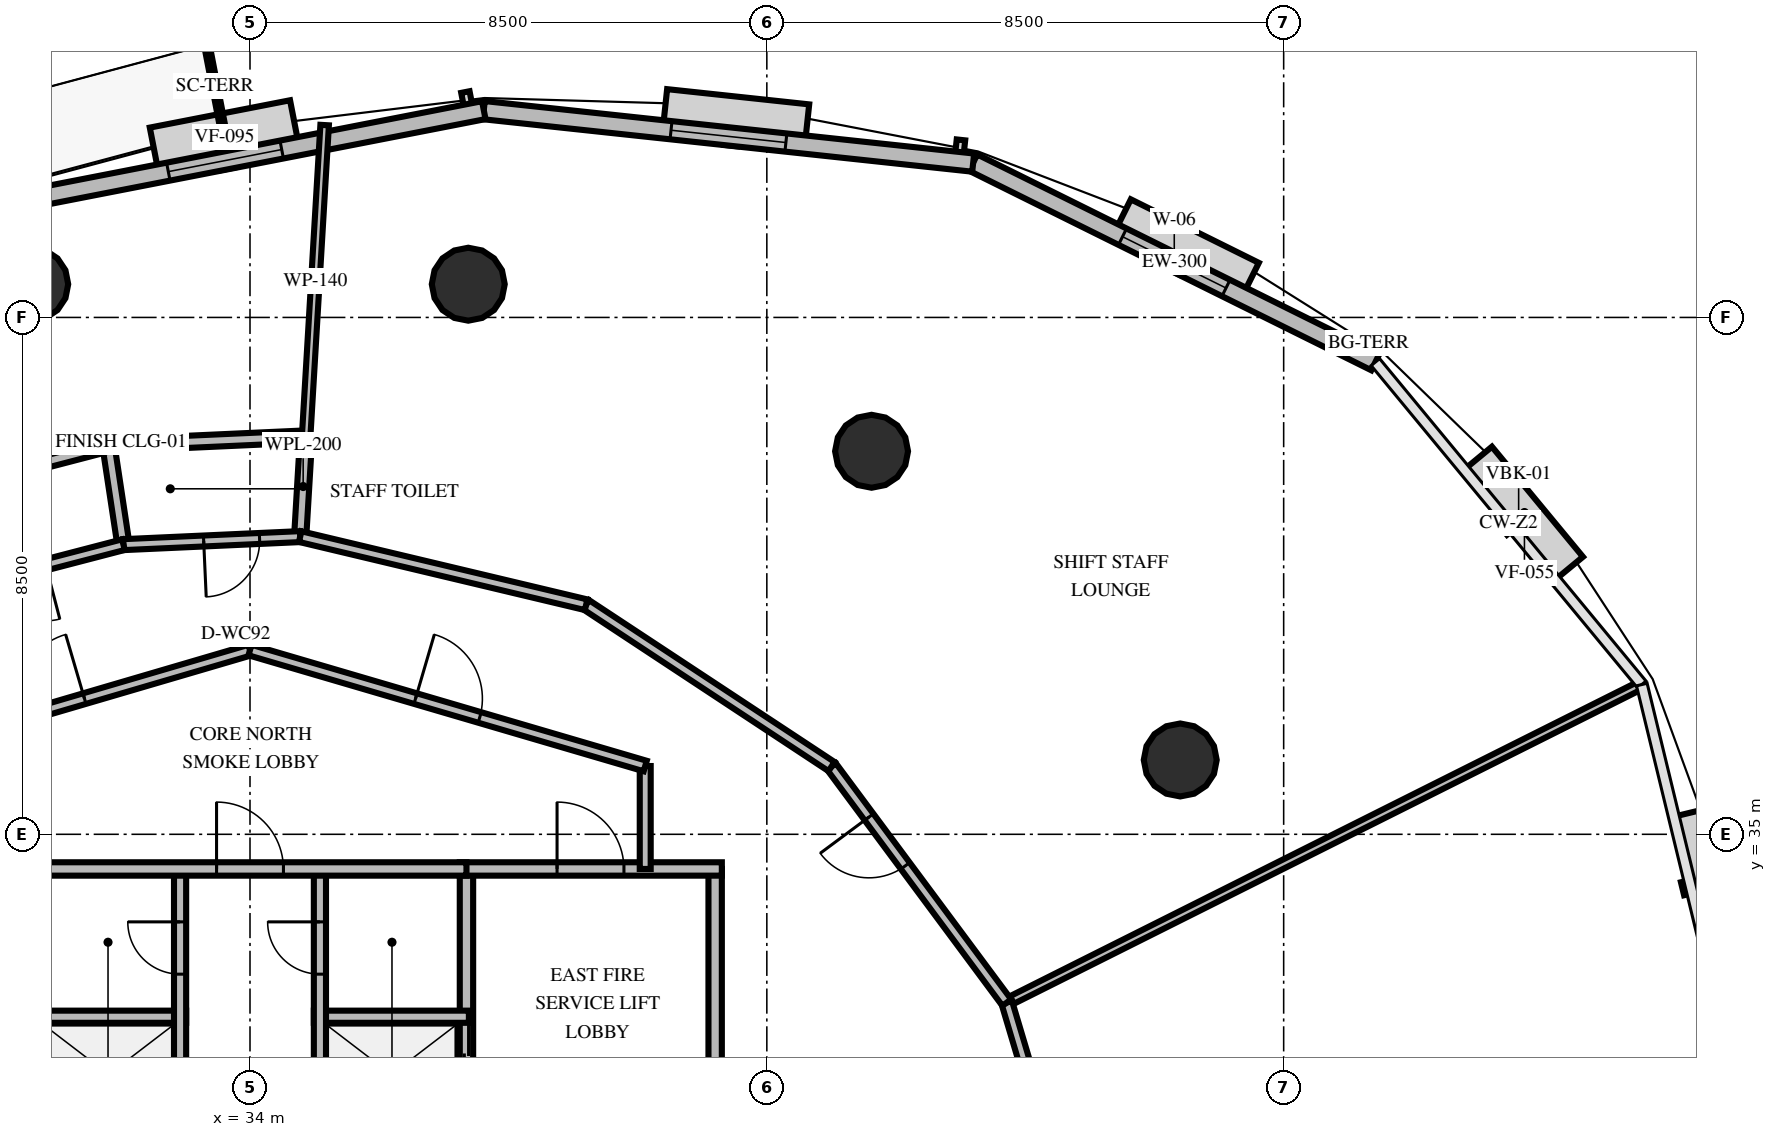
"""IFC4 building model, lengths in metres.
Left out: names, types, materials, properties, quantities, classifications, styles, units other than length and angle.
Written with IfcOpenShell. Run it as: python <this file> out.ifc"""

import sys

from ifc_helpers import new_model, si_unit, direction, frame, frame_2d, origin, origin_2d, place, context, subcontext, project, spatial, rectangle, circle, extrude, element, fill, save


model = new_model("IFC4")
c1 = context("Model", 3, precision=1e-05, world=origin(), true_north=direction((0.0, 1.0)))
c2 = subcontext(c1, "Body", "Model", "MODEL_VIEW")
j1 = project(units=[si_unit("LENGTHUNIT", "METRE"), si_unit("PLANEANGLEUNIT", "RADIAN")], contexts=[c1])
p1 = place(None, origin())
s1 = spatial("IfcSite", under=j1, at=p1, CompositionType="ELEMENT")
p2 = place(p1, origin())
s2 = spatial("IfcBuilding", under=s1, at=p2, CompositionType="ELEMENT")
p3 = place(p2, frame((0.0, 0.0, 145.8)))
s3 = spatial("IfcBuildingStorey", under=s2, at=p3, CompositionType="ELEMENT", Elevation=145.8)
for number, where, z_axis, x_axis in (
    (1, (49.299, 36.222, 0.0), (0.0, 0.0, 1.0), (1.0, 0.0, 0.0)),
    (2, (44.222, 41.299, 0.0), (0.0, 0.0, 1.0), (1.0, 0.0, 0.0)),
    (3, (37.59, 44.046, 0.0), (0.0, 0.0, 1.0), (1.0, 0.0, 0.0)),
    (4, (30.41, 44.046, 0.0), (0.0, 0.0, 1.0), (1.0, 0.0, 0.0)),
):
    element("IfcColumn", number, at=place(p3, frame(where, z_axis=z_axis, x_axis=x_axis)), inside=s3, PredefinedType="COLUMN", context=c2, shape_type="SweptSolid", body=[
        extrude(circle(Radius=0.6, at=origin_2d()), origin(), (0.0, 0.0, 1.0), 4.0),
    ])
p4 = place(p3, frame((52.508, 42.765, 0.0), z_axis=(0.0, 0.0, 1.0), x_axis=(-0.895870813497, 0.444314624477, 0.0)))
e5 = element("IfcWall", 5, at=p4, inside=s3, PredefinedType="SOLIDWALL", context=c2, shape_type="SweptSolid", body=[
    extrude(rectangle(XDim=7.383, YDim=0.3, at=frame_2d((3.692, 0.0))), origin(), (0.0, 0.0, 1.0), 2.9),
])
p5 = place(p4, frame((2.742, 0.0, 0.8)))
e6 = element("IfcOpeningElement", 6, at=p5, cuts=e5, PredefinedType="OPENING", context=c2, shape_type="SweptSolid", body=[
    extrude(rectangle(XDim=1.9, YDim=1.95, at=frame_2d((0.95, 0.975))), frame((0.0, 0.16, 0.0), z_axis=(0.0, -1.0, 0.0), x_axis=(1.0, 0.0, 0.0)), (0.0, 0.0, 1.0), 0.32),
])
p6 = place(p3, frame((45.894, 46.046, 0.0), z_axis=(0.0, 0.0, 1.0), x_axis=(-0.994303675946, 0.106584238983, 0.0)))
e7 = element("IfcWall", 7, at=p6, inside=s3, PredefinedType="SOLIDWALL", context=c2, shape_type="SweptSolid", body=[
    extrude(rectangle(XDim=8.095, YDim=0.3, at=frame_2d((4.047, 0.0))), origin(), (0.0, 0.0, 1.0), 2.9),
])
p7 = place(p6, frame((3.098, 0.0, 0.8)))
e8 = element("IfcOpeningElement", 8, at=p7, cuts=e7, PredefinedType="OPENING", context=c2, shape_type="SweptSolid", body=[
    extrude(rectangle(XDim=1.9, YDim=1.95, at=frame_2d((0.95, 0.975))), frame((0.0, 0.16, 0.0), z_axis=(0.0, -1.0, 0.0), x_axis=(1.0, 0.0, 0.0)), (0.0, 0.0, 1.0), 0.32),
])
p8 = place(p3, frame((37.845, 46.909, 0.0), z_axis=(0.0, 0.0, 1.0), x_axis=(-0.981531349689, -0.191301358011, 0.0)))
e9 = element("IfcWall", 9, at=p8, inside=s3, PredefinedType="SOLIDWALL", context=c2, shape_type="SweptSolid", body=[
    extrude(rectangle(XDim=8.673, YDim=0.3, at=frame_2d((4.336, 0.0))), origin(), (0.0, 0.0, 1.0), 2.9),
])
p9 = place(p8, frame((3.386, 0.0, 0.8)))
e10 = element("IfcOpeningElement", 10, at=p9, cuts=e9, PredefinedType="OPENING", context=c2, shape_type="SweptSolid", body=[
    extrude(rectangle(XDim=1.9, YDim=1.95, at=frame_2d((0.95, 0.975))), frame((0.0, 0.16, 0.0), z_axis=(0.0, -1.0, 0.0), x_axis=(1.0, 0.0, 0.0)), (0.0, 0.0, 1.0), 0.32),
])
p10 = place(p3, frame((30.4, 32.0, 0.0), z_axis=(0.0, 0.0, 1.0), x_axis=(1.0, 0.0, 0.0)))
e11 = element("IfcWall", 11, at=p10, inside=s3, PredefinedType="SOLIDWALL", context=c2, shape_type="SweptSolid", body=[
    extrude(rectangle(XDim=2.55, YDim=0.2, at=frame_2d((1.275, 0.0))), origin(), (0.0, 0.0, 1.0), 2.8),
])
p11 = place(p3, frame((32.85, 30.05, 0.0), z_axis=(0.0, 0.0, 1.0), x_axis=(0.0, 1.0, 0.0)))
e12 = element("IfcWall", 12, at=p11, inside=s3, PredefinedType="SOLIDWALL", context=c2, shape_type="SweptSolid", body=[
    extrude(rectangle(XDim=4.38, YDim=0.2, at=frame_2d((2.19, 0.0))), origin(), (0.0, 0.0, 1.0), 2.8),
])
p12 = place(p11, frame((2.65, 0.0, 0.0)))
e13 = element("IfcOpeningElement", 13, at=p12, cuts=e12, PredefinedType="OPENING", context=c2, shape_type="SweptSolid", body=[
    extrude(rectangle(XDim=0.86, YDim=2.05, at=frame_2d((0.43, 1.025))), frame((0.0, 0.11, 0.0), z_axis=(0.0, -1.0, 0.0), x_axis=(1.0, 0.0, 0.0)), (0.0, 0.0, 1.0), 0.22),
])
p13 = place(p3, frame((37.56, 30.05, 0.0), z_axis=(0.0, 0.0, 1.0), x_axis=(0.0, 1.0, 0.0)))
e14 = element("IfcWall", 14, at=p13, inside=s3, PredefinedType="SOLIDWALL", context=c2, shape_type="SweptSolid", body=[
    extrude(rectangle(XDim=4.38, YDim=0.22, at=frame_2d((2.19, 0.0))), origin(), (0.0, 0.0, 1.0), 2.8),
])
p14 = place(p13, frame((0.8, 0.0, 0.0)))
e15 = element("IfcOpeningElement", 15, at=p14, cuts=e14, PredefinedType="OPENING", context=c2, shape_type="SweptSolid", body=[
    extrude(rectangle(XDim=1.05, YDim=2.1, at=frame_2d((0.525, 1.05))), frame((0.0, 0.12, 0.0), z_axis=(0.0, -1.0, 0.0), x_axis=(1.0, 0.0, 0.0)), (0.0, 0.0, 1.0), 0.24),
])
p15 = place(p3, frame((41.65, 30.05, 0.0), z_axis=(0.0, 0.0, 1.0), x_axis=(0.0, 1.0, 0.0)))
e16 = element("IfcWall", 16, at=p15, inside=s3, PredefinedType="SOLIDWALL", context=c2, shape_type="SweptSolid", body=[
    extrude(rectangle(XDim=4.38, YDim=0.22, at=frame_2d((2.19, 0.0))), origin(), (0.0, 0.0, 1.0), 2.8),
])
p16 = place(p3, frame((37.45, 34.43, 0.0), z_axis=(0.0, 0.0, 1.0), x_axis=(1.0, 0.0, 0.0)))
e17 = element("IfcWall", 17, at=p16, inside=s3, PredefinedType="SOLIDWALL", context=c2, shape_type="SweptSolid", body=[
    extrude(rectangle(XDim=4.31, YDim=0.22, at=frame_2d((2.155, 0.0))), origin(), (0.0, 0.0, 1.0), 2.8),
])
p17 = place(p16, frame((1.6, 0.0, 0.0)))
e18 = element("IfcOpeningElement", 18, at=p17, cuts=e17, PredefinedType="OPENING", context=c2, shape_type="SweptSolid", body=[
    extrude(rectangle(XDim=1.1, YDim=2.15, at=frame_2d((0.55, 1.075))), frame((0.0, 0.12, 0.0), z_axis=(0.0, -1.0, 0.0), x_axis=(1.0, 0.0, 0.0)), (0.0, 0.0, 1.0), 0.24),
])
p18 = place(p3, frame((35.05, 32.0, 0.0), z_axis=(0.0, 0.0, 1.0), x_axis=(1.0, 0.0, 0.0)))
e19 = element("IfcWall", 19, at=p18, inside=s3, PredefinedType="SOLIDWALL", context=c2, shape_type="SweptSolid", body=[
    extrude(rectangle(XDim=2.55, YDim=0.2, at=frame_2d((1.275, 0.0))), origin(), (0.0, 0.0, 1.0), 2.8),
])
p19 = place(p3, frame((35.15, 30.05, 0.0), z_axis=(0.0, 0.0, 1.0), x_axis=(0.0, 1.0, 0.0)))
e20 = element("IfcWall", 20, at=p19, inside=s3, PredefinedType="SOLIDWALL", context=c2, shape_type="SweptSolid", body=[
    extrude(rectangle(XDim=4.38, YDim=0.2, at=frame_2d((2.19, 0.0))), origin(), (0.0, 0.0, 1.0), 2.8),
])
p20 = place(p19, frame((2.65, 0.0, 0.0)))
e21 = element("IfcOpeningElement", 21, at=p20, cuts=e20, PredefinedType="OPENING", context=c2, shape_type="SweptSolid", body=[
    extrude(rectangle(XDim=0.86, YDim=2.05, at=frame_2d((0.43, 1.025))), frame((0.0, 0.11, 0.0), z_axis=(0.0, -1.0, 0.0), x_axis=(1.0, 0.0, 0.0)), (0.0, 0.0, 1.0), 0.22),
])
p21 = place(p3, frame((30.44, 34.43, 0.0), z_axis=(0.0, 0.0, 1.0), x_axis=(1.0, 0.0, 0.0)))
e22 = element("IfcWall", 22, at=p21, inside=s3, PredefinedType="SOLIDWALL", context=c2, shape_type="SweptSolid", body=[
    extrude(rectangle(XDim=7.12, YDim=0.22, at=frame_2d((3.56, 0.0))), origin(), (0.0, 0.0, 1.0), 2.8),
])
p22 = place(p21, frame((3.01, 0.0, 0.0)))
e23 = element("IfcOpeningElement", 23, at=p22, cuts=e22, PredefinedType="OPENING", context=c2, shape_type="SweptSolid", body=[
    extrude(rectangle(XDim=1.1, YDim=2.15, at=frame_2d((0.55, 1.075))), frame((0.0, 0.12, 0.0), z_axis=(0.0, -1.0, 0.0), x_axis=(1.0, 0.0, 0.0)), (0.0, 0.0, 1.0), 0.24),
])
p23 = place(p3, frame((40.5, 36.123, 0.0), z_axis=(0.0, 0.0, 1.0), x_axis=(0.0, -1.0, 0.0)))
e24 = element("IfcWall", 24, at=p23, inside=s3, PredefinedType="PARTITIONING", context=c2, shape_type="SweptSolid", body=[
    extrude(rectangle(XDim=1.693, YDim=0.18, at=frame_2d((0.846, 0.0))), origin(), (0.0, 0.0, 1.0), 2.8),
])
p24 = place(p3, frame((27.5, 36.123, 0.0), z_axis=(0.0, 0.0, 1.0), x_axis=(0.959546654541, 0.281549671923, 0.0)))
e25 = element("IfcWall", 25, at=p24, inside=s3, PredefinedType="PARTITIONING", context=c2, shape_type="SweptSolid", body=[
    extrude(rectangle(XDim=6.774, YDim=0.18, at=frame_2d((3.387, 0.0))), origin(), (0.0, 0.0, 1.0), 2.8),
])
p25 = place(p24, frame((2.837, 0.0, 0.0)))
e26 = element("IfcOpeningElement", 26, at=p25, cuts=e25, PredefinedType="OPENING", context=c2, shape_type="SweptSolid", body=[
    extrude(rectangle(XDim=1.1, YDim=2.15, at=frame_2d((0.55, 1.075))), frame((0.0, 0.1, 0.0), z_axis=(0.0, -1.0, 0.0), x_axis=(1.0, 0.0, 0.0)), (0.0, 0.0, 1.0), 0.2),
])
p26 = place(p3, frame((34.0, 38.03, 0.0), z_axis=(0.0, 0.0, 1.0), x_axis=(0.959546654541, -0.281549671923, 0.0)))
e27 = element("IfcWall", 27, at=p26, inside=s3, PredefinedType="PARTITIONING", context=c2, shape_type="SweptSolid", body=[
    extrude(rectangle(XDim=6.774, YDim=0.18, at=frame_2d((3.387, 0.0))), origin(), (0.0, 0.0, 1.0), 2.8),
])
p27 = place(p26, frame((2.837, 0.0, 0.0)))
e28 = element("IfcOpeningElement", 28, at=p27, cuts=e27, PredefinedType="OPENING", context=c2, shape_type="SweptSolid", body=[
    extrude(rectangle(XDim=1.1, YDim=2.15, at=frame_2d((0.55, 1.075))), frame((0.0, 0.1, 0.0), z_axis=(0.0, -1.0, 0.0), x_axis=(1.0, 0.0, 0.0)), (0.0, 0.0, 1.0), 0.2),
])
p28 = place(p3, frame((34.825, 39.896, 0.0), z_axis=(0.0, 0.0, 1.0), x_axis=(0.05933789207, 0.998237954881, 0.0)))
e29 = element("IfcWall", 29, at=p28, inside=s3, PredefinedType="PLUMBINGWALL", context=c2, shape_type="SweptSolid", body=[
    extrude(rectangle(XDim=1.65, YDim=0.2, at=frame_2d((0.825, 0.0))), origin(), (0.0, 0.0, 1.0), 2.8),
])
p29 = place(p3, frame((31.918, 39.763, 0.0), z_axis=(0.0, 0.0, 1.0), x_axis=(-0.149577473976, 0.988750008485, 0.0)))
e30 = element("IfcWall", 30, at=p29, inside=s3, PredefinedType="PLUMBINGWALL", context=c2, shape_type="SweptSolid", body=[
    extrude(rectangle(XDim=1.65, YDim=0.2, at=frame_2d((0.825, 0.0))), origin(), (0.0, 0.0, 1.0), 2.8),
])
p30 = place(p3, frame((34.923, 41.542, 0.0), z_axis=(0.0, 0.0, 1.0), x_axis=(-0.998973328689, -0.045302191646, 0.0)))
e31 = element("IfcWall", 31, at=p30, inside=s3, PredefinedType="PLUMBINGWALL", context=c2, shape_type="SweptSolid", body=[
    extrude(rectangle(XDim=3.255, YDim=0.2, at=frame_2d((1.627, 0.0))), origin(), (0.0, 0.0, 1.0), 2.8),
])
p31 = place(p3, frame((34.825, 39.896, 0.0), z_axis=(0.0, 0.0, 1.0), x_axis=(-0.998969404953, -0.045388632576, 0.0)))
e32 = element("IfcWall", 32, at=p31, inside=s3, PredefinedType="PARTITIONING", context=c2, shape_type="SweptSolid", body=[
    extrude(rectangle(XDim=2.91, YDim=0.18, at=frame_2d((1.455, 0.0))), origin(), (0.0, 0.0, 1.0), 2.8),
])
p32 = place(p31, frame((0.669, 0.0, 0.0)))
e33 = element("IfcOpeningElement", 33, at=p32, cuts=e32, PredefinedType="OPENING", context=c2, shape_type="SweptSolid", body=[
    extrude(rectangle(XDim=0.92, YDim=2.1, at=frame_2d((0.46, 1.05))), frame((0.0, 0.1, 0.0), z_axis=(0.0, -1.0, 0.0), x_axis=(1.0, 0.0, 0.0)), (0.0, 0.0, 1.0), 0.2),
])
p33 = place(p3, frame((31.672, 41.395, 0.0), z_axis=(0.0, 0.0, 1.0), x_axis=(-0.967704034171, -0.252089076023, 0.0)))
e34 = element("IfcWall", 34, at=p33, inside=s3, PredefinedType="PLUMBINGWALL", context=c2, shape_type="SweptSolid", body=[
    extrude(rectangle(XDim=3.255, YDim=0.2, at=frame_2d((1.627, 0.0))), origin(), (0.0, 0.0, 1.0), 2.8),
])
p34 = place(p3, frame((31.918, 39.763, 0.0), z_axis=(0.0, 0.0, 1.0), x_axis=(-0.967701853081, -0.252097448505, 0.0)))
e35 = element("IfcWall", 35, at=p34, inside=s3, PredefinedType="PARTITIONING", context=c2, shape_type="SweptSolid", body=[
    extrude(rectangle(XDim=2.91, YDim=0.18, at=frame_2d((1.455, 0.0))), origin(), (0.0, 0.0, 1.0), 2.8),
])
p35 = place(p34, frame((1.321, 0.0, 0.0)))
e36 = element("IfcOpeningElement", 36, at=p35, cuts=e35, PredefinedType="OPENING", context=c2, shape_type="SweptSolid", body=[
    extrude(rectangle(XDim=0.92, YDim=2.1, at=frame_2d((0.46, 1.05))), frame((0.0, 0.1, 0.0), z_axis=(0.0, -1.0, 0.0), x_axis=(1.0, 0.0, 0.0)), (0.0, 0.0, 1.0), 0.2),
])
p36 = place(p3, frame((34.923, 41.542, 0.0), z_axis=(0.0, 0.0, 1.0), x_axis=(0.059296698215, 0.998240402699, 0.0)))
e37 = element("IfcWall", 37, at=p36, inside=s3, PredefinedType="PARTITIONING", context=c2, shape_type="SweptSolid", body=[
    extrude(rectangle(XDim=5.13, YDim=0.14, at=frame_2d((2.565, 0.0))), origin(), (0.0, 0.0, 1.0), 2.8),
])
p37 = place(p3, frame((46.447, 32.233, 0.0), z_axis=(0.0, 0.0, 1.0), x_axis=(0.894159481229, 0.447748614882, 0.0)))
e38 = element("IfcWall", 38, at=p37, inside=s3, PredefinedType="PARTITIONING", context=c2, shape_type="SweptSolid", body=[
    extrude(rectangle(XDim=11.68, YDim=0.14, at=frame_2d((5.84, 0.0))), origin(), (0.0, 0.0, 1.0), 2.8),
])
p38 = place(p3, frame((47.828, 27.6, 0.0), z_axis=(0.0, 0.0, 1.0), x_axis=(-0.285674945377, 0.958326575643, 0.0)))
e39 = element("IfcWall", 39, at=p38, inside=s3, PredefinedType="PARTITIONING", context=c2, shape_type="SweptSolid", body=[
    extrude(rectangle(XDim=4.834, YDim=0.18, at=frame_2d((2.417, 0.0))), origin(), (0.0, 0.0, 1.0), 2.8),
])
p39 = place(p3, frame((46.447, 32.233, 0.0), z_axis=(0.0, 0.0, 1.0), x_axis=(-0.596219858709, 0.802821200568, 0.0)))
e40 = element("IfcWall", 40, at=p39, inside=s3, PredefinedType="PARTITIONING", context=c2, shape_type="SweptSolid", body=[
    extrude(rectangle(XDim=4.834, YDim=0.18, at=frame_2d((2.417, 0.0))), origin(), (0.0, 0.0, 1.0), 2.8),
])
p40 = place(p39, frame((2.801, 0.0, 0.0)))
e41 = element("IfcOpeningElement", 41, at=p40, cuts=e40, PredefinedType="OPENING", context=c2, shape_type="SweptSolid", body=[
    extrude(rectangle(XDim=1.0, YDim=2.15, at=frame_2d((0.5, 1.075))), frame((0.0, 0.1, 0.0), z_axis=(0.0, -1.0, 0.0), x_axis=(1.0, 0.0, 0.0)), (0.0, 0.0, 1.0), 0.2),
])
p41 = place(p3, frame((43.564, 36.114, 0.0), z_axis=(0.0, 0.0, 1.0), x_axis=(-0.834852183568, 0.550474187943, 0.0)))
e42 = element("IfcWall", 42, at=p41, inside=s3, PredefinedType="PARTITIONING", context=c2, shape_type="SweptSolid", body=[
    extrude(rectangle(XDim=4.834, YDim=0.18, at=frame_2d((2.417, 0.0))), origin(), (0.0, 0.0, 1.0), 2.8),
])
p42 = place(p3, frame((39.528, 38.775, 0.0), z_axis=(0.0, 0.0, 1.0), x_axis=(-0.972776947404, 0.231743415441, 0.0)))
e43 = element("IfcWall", 43, at=p42, inside=s3, PredefinedType="PARTITIONING", context=c2, shape_type="SweptSolid", body=[
    extrude(rectangle(XDim=4.834, YDim=0.18, at=frame_2d((2.417, 0.0))), origin(), (0.0, 0.0, 1.0), 2.8),
])
p43 = place(p5, origin())
e44 = element("IfcWindow", 44, at=p43, inside=s3, PartitioningType="SINGLE_PANEL", PredefinedType="WINDOW", context=c2, shape_type="SweptSolid", body=[
    extrude(rectangle(XDim=1.9, YDim=1.95, at=frame_2d((0.95, 0.975))), frame((0.0, 0.03, 0.0), z_axis=(0.0, -1.0, 0.0), x_axis=(1.0, 0.0, 0.0)), (0.0, 0.0, 1.0), 0.06),
])
fill(e6, e44)
p44 = place(p7, origin())
e45 = element("IfcWindow", 45, at=p44, inside=s3, PartitioningType="SINGLE_PANEL", PredefinedType="WINDOW", context=c2, shape_type="SweptSolid", body=[
    extrude(rectangle(XDim=1.9, YDim=1.95, at=frame_2d((0.95, 0.975))), frame((0.0, 0.03, 0.0), z_axis=(0.0, -1.0, 0.0), x_axis=(1.0, 0.0, 0.0)), (0.0, 0.0, 1.0), 0.06),
])
fill(e8, e45)
p45 = place(p9, origin())
e46 = element("IfcWindow", 46, at=p45, inside=s3, PartitioningType="SINGLE_PANEL", PredefinedType="WINDOW", context=c2, shape_type="SweptSolid", body=[
    extrude(rectangle(XDim=1.9, YDim=1.95, at=frame_2d((0.95, 0.975))), frame((0.0, 0.03, 0.0), z_axis=(0.0, -1.0, 0.0), x_axis=(1.0, 0.0, 0.0)), (0.0, 0.0, 1.0), 0.06),
])
fill(e10, e46)
p46 = place(p12, origin())
e47 = element("IfcDoor", 47, at=p46, inside=s3, OperationType="SINGLE_SWING_RIGHT", PredefinedType="TRAPDOOR", context=c2, shape_type="SweptSolid", body=[
    extrude(rectangle(XDim=0.86, YDim=2.05, at=frame_2d((0.43, 1.025))), frame((0.0, 0.025, 0.0), z_axis=(0.0, -1.0, 0.0), x_axis=(1.0, 0.0, 0.0)), (0.0, 0.0, 1.0), 0.05),
])
fill(e13, e47)
p47 = place(p17, origin())
e48 = element("IfcDoor", 48, at=p47, inside=s3, OperationType="SINGLE_SWING_LEFT", PredefinedType="DOOR", context=c2, shape_type="SweptSolid", body=[
    extrude(rectangle(XDim=1.1, YDim=2.15, at=frame_2d((0.55, 1.075))), frame((0.0, 0.025, 0.0), z_axis=(0.0, -1.0, 0.0), x_axis=(1.0, 0.0, 0.0)), (0.0, 0.0, 1.0), 0.05),
])
fill(e18, e48)
p48 = place(p14, origin())
e49 = element("IfcDoor", 49, at=p48, inside=s3, OperationType="DOUBLE_DOOR_SLIDING", PredefinedType="USERDEFINED", context=c2, shape_type="SweptSolid", body=[
    extrude(rectangle(XDim=1.05, YDim=2.1, at=frame_2d((0.525, 1.05))), frame((0.0, 0.025, 0.0), z_axis=(0.0, -1.0, 0.0), x_axis=(1.0, 0.0, 0.0)), (0.0, 0.0, 1.0), 0.05),
])
fill(e15, e49)
p49 = place(p20, origin())
e50 = element("IfcDoor", 50, at=p49, inside=s3, OperationType="SINGLE_SWING_RIGHT", PredefinedType="TRAPDOOR", context=c2, shape_type="SweptSolid", body=[
    extrude(rectangle(XDim=0.86, YDim=2.05, at=frame_2d((0.43, 1.025))), frame((0.0, 0.025, 0.0), z_axis=(0.0, -1.0, 0.0), x_axis=(1.0, 0.0, 0.0)), (0.0, 0.0, 1.0), 0.05),
])
fill(e21, e50)
p50 = place(p22, origin())
e51 = element("IfcDoor", 51, at=p50, inside=s3, OperationType="SINGLE_SWING_LEFT", PredefinedType="DOOR", context=c2, shape_type="SweptSolid", body=[
    extrude(rectangle(XDim=1.1, YDim=2.15, at=frame_2d((0.55, 1.075))), frame((0.0, 0.025, 0.0), z_axis=(0.0, -1.0, 0.0), x_axis=(1.0, 0.0, 0.0)), (0.0, 0.0, 1.0), 0.05),
])
fill(e23, e51)
p51 = place(p25, origin())
e52 = element("IfcDoor", 52, at=p51, inside=s3, OperationType="SINGLE_SWING_RIGHT", PredefinedType="DOOR", context=c2, shape_type="SweptSolid", body=[
    extrude(rectangle(XDim=1.1, YDim=2.15, at=frame_2d((0.55, 1.075))), frame((0.0, 0.025, 0.0), z_axis=(0.0, -1.0, 0.0), x_axis=(1.0, 0.0, 0.0)), (0.0, 0.0, 1.0), 0.05),
])
fill(e26, e52)
p52 = place(p27, origin())
e53 = element("IfcDoor", 53, at=p52, inside=s3, OperationType="SINGLE_SWING_LEFT", PredefinedType="DOOR", context=c2, shape_type="SweptSolid", body=[
    extrude(rectangle(XDim=1.1, YDim=2.15, at=frame_2d((0.55, 1.075))), frame((0.0, 0.025, 0.0), z_axis=(0.0, -1.0, 0.0), x_axis=(1.0, 0.0, 0.0)), (0.0, 0.0, 1.0), 0.05),
])
fill(e28, e53)
p53 = place(p32, origin())
e54 = element("IfcDoor", 54, at=p53, inside=s3, OperationType="SINGLE_SWING_RIGHT", PredefinedType="DOOR", context=c2, shape_type="SweptSolid", body=[
    extrude(rectangle(XDim=0.92, YDim=2.1, at=frame_2d((0.46, 1.05))), frame((0.0, 0.025, 0.0), z_axis=(0.0, -1.0, 0.0), x_axis=(1.0, 0.0, 0.0)), (0.0, 0.0, 1.0), 0.05),
])
fill(e33, e54)
p54 = place(p40, origin())
e55 = element("IfcDoor", 55, at=p54, inside=s3, OperationType="SINGLE_SWING_RIGHT", PredefinedType="DOOR", context=c2, shape_type="SweptSolid", body=[
    extrude(rectangle(XDim=1.0, YDim=2.15, at=frame_2d((0.5, 1.075))), frame((0.0, 0.025, 0.0), z_axis=(0.0, -1.0, 0.0), x_axis=(1.0, 0.0, 0.0)), (0.0, 0.0, 1.0), 0.05),
])
fill(e41, e55)
save(model, sys.argv[1])
